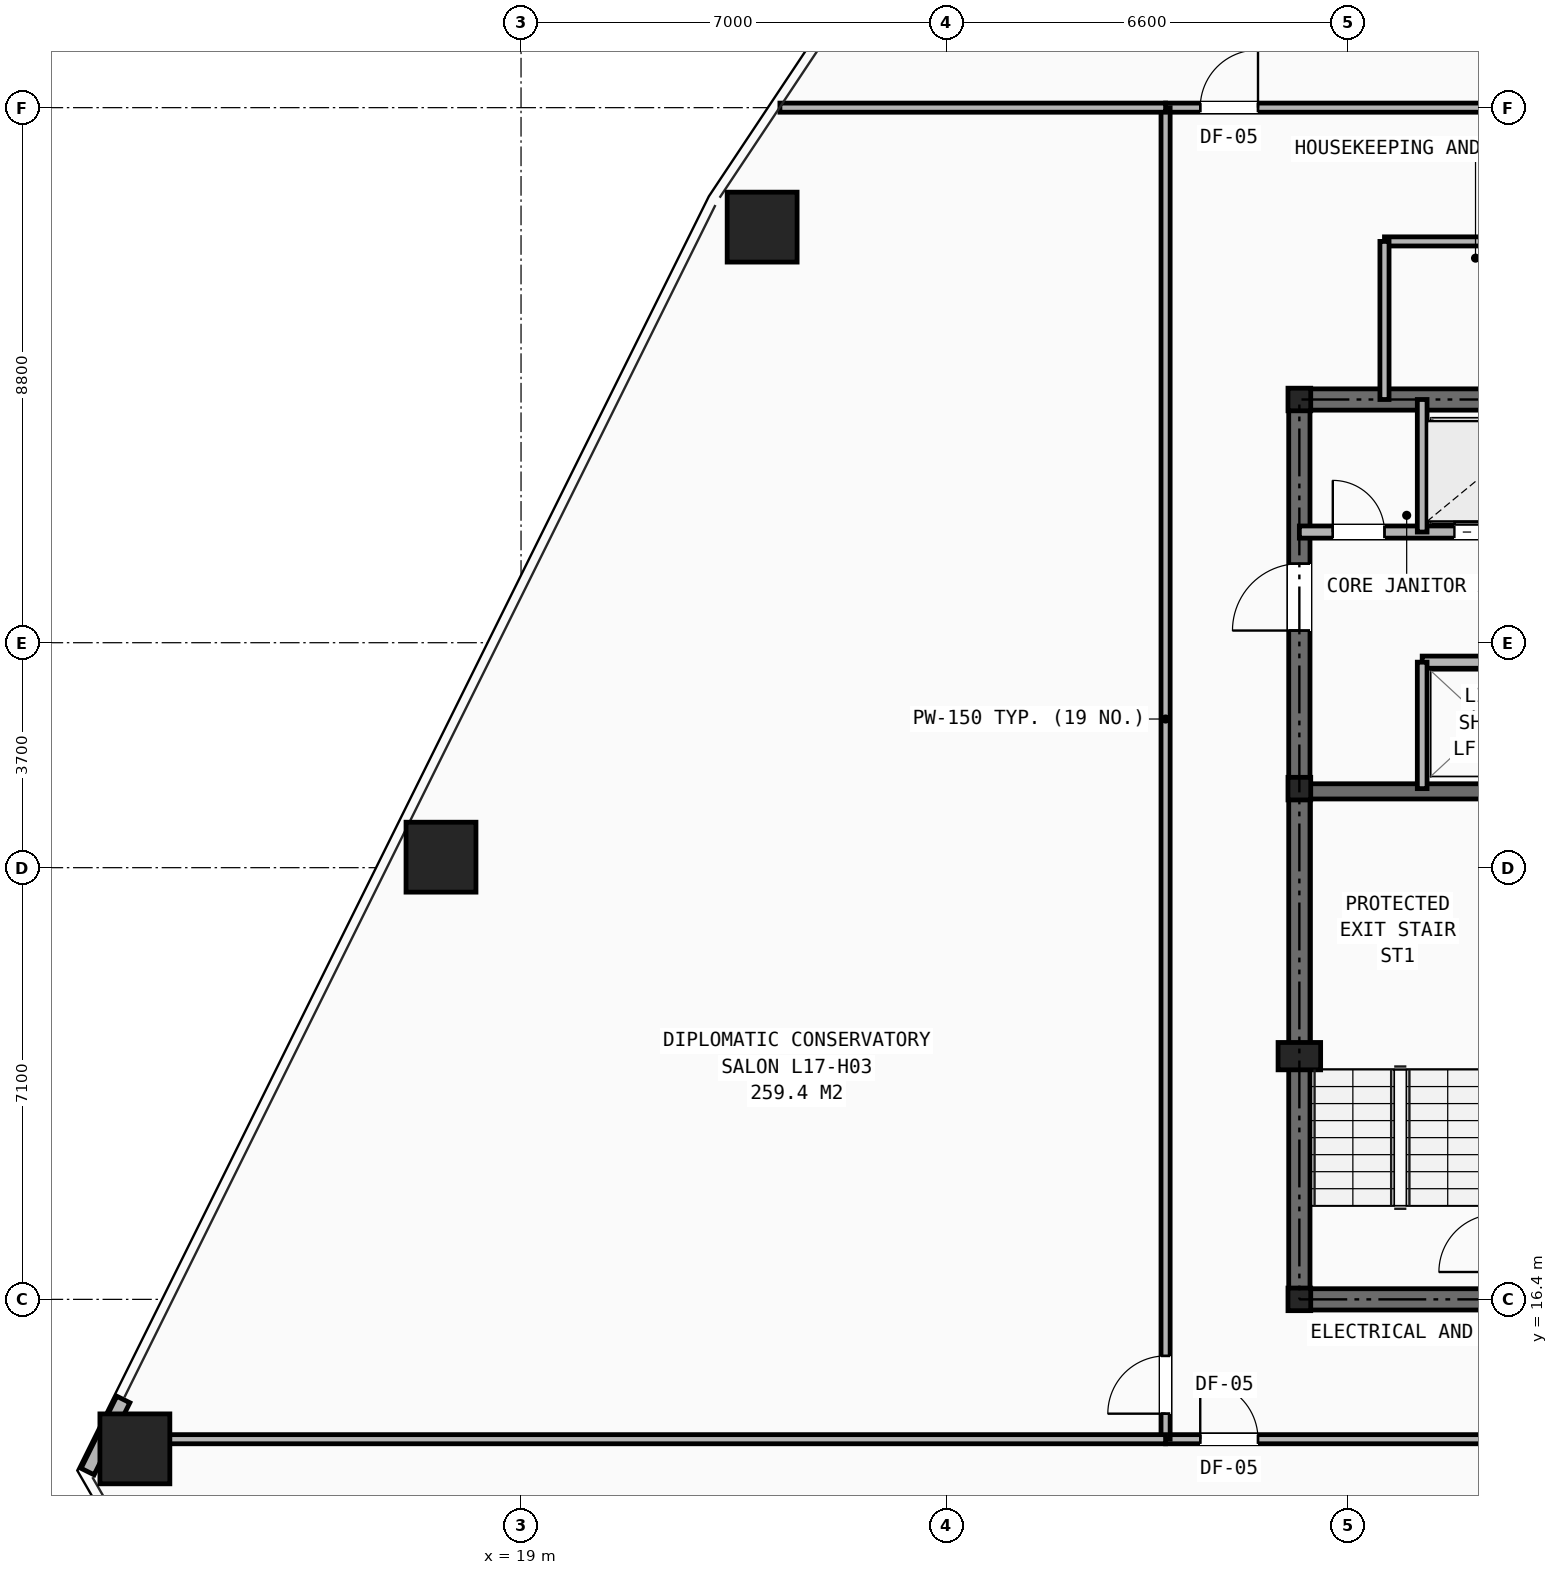
"""IFC4 building model, lengths in metres.
Left out: names, types, materials, properties, quantities, classifications, styles, units other than length and angle.
Written with IfcOpenShell. Run it as: python <this file> out.ifc"""

import sys

from ifc_helpers import new_model, si_unit, direction, frame, frame_2d, origin, origin_2d, place, context, subcontext, project, spatial, rectangle, hollow_rectangle, i_section, extrude, element, fill, save


model = new_model("IFC4")
c1 = context("Model", 3, precision=1e-05, world=origin(), true_north=direction((0.0, 1.0)))
c2 = subcontext(c1, "Body", "Model", "MODEL_VIEW")
j1 = project(units=[si_unit("LENGTHUNIT", "METRE"), si_unit("PLANEANGLEUNIT", "RADIAN")], contexts=[c1])
p1 = place(None, origin())
s1 = spatial("IfcSite", under=j1, at=p1, CompositionType="ELEMENT")
p2 = place(p1, origin())
s2 = spatial("IfcBuilding", under=s1, at=p2, CompositionType="ELEMENT")
p3 = place(p2, frame((0.0, 0.0, 62.4)))
s3 = spatial("IfcBuildingStorey", under=s2, at=p3, CompositionType="ELEMENT", Elevation=62.4)
for number, where, z_axis, x_axis in (
    (1, (31.8, 16.4, 0.0), (0.0, 0.0, 1.0), (1.0, 0.0, 0.0)),
    (2, (31.8, 24.8, 0.0), (0.0, 0.0, 1.0), (1.0, 0.0, 0.0)),
    (3, (31.8, 31.2, 0.0), (0.0, 0.0, 1.0), (1.0, 0.0, 0.0)),
):
    element("IfcColumn", number, at=place(p3, frame(where, z_axis=z_axis, x_axis=x_axis)), inside=s3, PredefinedType="COLUMN", context=c2, shape_type="SweptSolid", body=[
        extrude(i_section(OverallWidth=0.374, OverallDepth=0.372, WebThickness=0.016, FlangeThickness=0.026, at=origin_2d()), origin(), (0.0, 0.0, 1.0), 3.2),
    ])
p4 = place(p3, frame((31.8, 20.4, 0.0), z_axis=(0.0, 0.0, 1.0), x_axis=(1.0, 0.0, 0.0)))
e4 = element("IfcColumn", 4, at=p4, inside=s3, PredefinedType="PILASTER", context=c2, shape_type="SweptSolid", body=[
    extrude(rectangle(XDim=0.7, YDim=0.45, at=origin_2d()), origin(), (0.0, 0.0, 1.0), 3.2),
])
for number, where, z_axis, x_axis in (
    (5, (22.965, 34.035, 0.0), (0.0, 0.0, 1.0), (1.0, 0.0, 0.0)),
    (6, (17.684, 23.673, 0.0), (0.0, 0.0, 1.0), (1.0, 0.0, 0.0)),
    (7, (12.649, 13.941, 0.0), (0.0, 0.0, 1.0), (1.0, 0.0, 0.0)),
):
    element("IfcColumn", number, at=place(p3, frame(where, z_axis=z_axis, x_axis=x_axis)), inside=s3, PredefinedType="COLUMN", context=c2, shape_type="SweptSolid", body=[
        extrude(hollow_rectangle(XDim=1.15, YDim=1.15, WallThickness=0.075, at=origin_2d()), origin(), (0.0, 0.0, 1.0), 3.2),
    ])
p5 = place(p3, frame((12.459, 14.754, 0.0), z_axis=(0.0, 0.0, 1.0), x_axis=(-0.444037765369, -0.896008070793, 0.0)))
e8 = element("IfcWall", 8, at=p5, inside=s3, PredefinedType="SHEAR", context=c2, shape_type="SweptSolid", body=[
    extrude(rectangle(XDim=1.323, YDim=0.24, at=frame_2d((0.662, 0.0))), origin(), (0.0, 0.0, 1.0), 2.263),
])
p6 = place(p3, frame((31.8, 16.4, 0.0), z_axis=(0.0, 0.0, 1.0), x_axis=(1.0, 0.0, 0.0)))
e9 = element("IfcWall", 9, at=p6, inside=s3, PredefinedType="SHEAR", context=c2, shape_type="SweptSolid", body=[
    extrude(rectangle(XDim=16.4, YDim=0.35, at=frame_2d((8.2, 0.0))), origin(), (0.0, 0.0, 1.0), 2.98),
])
p7 = place(p6, frame((7.75, 0.0, 0.0)))
e10 = element("IfcOpeningElement", 10, at=p7, cuts=e9, PredefinedType="OPENING", context=c2, shape_type="SweptSolid", body=[
    extrude(rectangle(XDim=0.9, YDim=2.1, at=frame_2d((0.45, 1.05))), frame((0.0, 0.185, 0.0), z_axis=(0.0, -1.0, 0.0), x_axis=(1.0, 0.0, 0.0)), (0.0, 0.0, 1.0), 0.37),
])
p8 = place(p6, frame((4.2, 0.0, 0.0)))
e11 = element("IfcOpeningElement", 11, at=p8, cuts=e9, PredefinedType="OPENING", context=c2, shape_type="SweptSolid", body=[
    extrude(rectangle(XDim=0.95, YDim=2.1, at=frame_2d((0.475, 1.05))), frame((0.0, 0.185, 0.0), z_axis=(0.0, -1.0, 0.0), x_axis=(1.0, 0.0, 0.0)), (0.0, 0.0, 1.0), 0.37),
])
p9 = place(p6, frame((10.6, 0.0, 0.0)))
e12 = element("IfcOpeningElement", 12, at=p9, cuts=e9, PredefinedType="OPENING", context=c2, shape_type="SweptSolid", body=[
    extrude(rectangle(XDim=0.95, YDim=2.1, at=frame_2d((0.475, 1.05))), frame((0.0, 0.185, 0.0), z_axis=(0.0, -1.0, 0.0), x_axis=(1.0, 0.0, 0.0)), (0.0, 0.0, 1.0), 0.37),
])
p10 = place(p3, frame((31.8, 31.2, 0.0), z_axis=(0.0, 0.0, 1.0), x_axis=(1.0, 0.0, 0.0)))
e13 = element("IfcWall", 13, at=p10, inside=s3, PredefinedType="SHEAR", context=c2, shape_type="SweptSolid", body=[
    extrude(rectangle(XDim=16.4, YDim=0.35, at=frame_2d((8.2, 0.0))), origin(), (0.0, 0.0, 1.0), 2.98),
])
p11 = place(p3, frame((31.8, 16.4, 0.0), z_axis=(0.0, 0.0, 1.0), x_axis=(0.0, 1.0, 0.0)))
e14 = element("IfcWall", 14, at=p11, inside=s3, PredefinedType="SHEAR", context=c2, shape_type="SweptSolid", body=[
    extrude(rectangle(XDim=14.8, YDim=0.35, at=frame_2d((7.4, 0.0))), origin(), (0.0, 0.0, 1.0), 2.98),
])
p12 = place(p11, frame((11.0, 0.0, 0.0)))
e15 = element("IfcOpeningElement", 15, at=p12, cuts=e14, PredefinedType="OPENING", context=c2, shape_type="SweptSolid", body=[
    extrude(rectangle(XDim=1.1, YDim=2.15, at=frame_2d((0.55, 1.075))), frame((0.0, 0.185, 0.0), z_axis=(0.0, -1.0, 0.0), x_axis=(1.0, 0.0, 0.0)), (0.0, 0.0, 1.0), 0.37),
])
p13 = place(p3, frame((31.8, 24.755, 0.0), z_axis=(0.0, 0.0, 1.0), x_axis=(1.0, 0.0, 0.0)))
e16 = element("IfcWall", 16, at=p13, inside=s3, PredefinedType="SHEAR", context=c2, shape_type="SweptSolid", body=[
    extrude(rectangle(XDim=3.245, YDim=0.25, at=frame_2d((1.623, 0.0))), origin(), (0.0, 0.0, 1.0), 2.98),
])
p14 = place(p3, frame((31.8, 29.02, 0.0), z_axis=(0.0, 0.0, 1.0), x_axis=(1.0, 0.0, 0.0)))
e17 = element("IfcWall", 17, at=p14, inside=s3, PredefinedType="SOLIDWALL", context=c2, shape_type="SweptSolid", body=[
    extrude(rectangle(XDim=16.4, YDim=0.2, at=frame_2d((8.2, 0.0))), origin(), (0.0, 0.0, 1.0), 2.431),
])
p15 = place(p14, frame((0.55, 0.0, 0.0)))
e18 = element("IfcOpeningElement", 18, at=p15, cuts=e17, PredefinedType="OPENING", context=c2, shape_type="SweptSolid", body=[
    extrude(rectangle(XDim=0.85, YDim=2.05, at=frame_2d((0.425, 1.025))), frame((0.0, 0.11, 0.0), z_axis=(0.0, -1.0, 0.0), x_axis=(1.0, 0.0, 0.0)), (0.0, 0.0, 1.0), 0.22),
])
p16 = place(p14, frame((2.55, 0.0, 0.0)))
e19 = element("IfcOpeningElement", 19, at=p16, cuts=e17, PredefinedType="OPENING", context=c2, shape_type="SweptSolid", body=[
    extrude(rectangle(XDim=1.1, YDim=2.15, at=frame_2d((0.55, 1.075))), frame((0.0, 0.11, 0.0), z_axis=(0.0, -1.0, 0.0), x_axis=(1.0, 0.0, 0.0)), (0.0, 0.0, 1.0), 0.22),
])
p17 = place(p14, frame((4.71, 0.0, 0.0)))
e20 = element("IfcOpeningElement", 20, at=p17, cuts=e17, PredefinedType="OPENING", context=c2, shape_type="SweptSolid", body=[
    extrude(rectangle(XDim=1.1, YDim=2.15, at=frame_2d((0.55, 1.075))), frame((0.0, 0.11, 0.0), z_axis=(0.0, -1.0, 0.0), x_axis=(1.0, 0.0, 0.0)), (0.0, 0.0, 1.0), 0.22),
])
p18 = place(p14, frame((6.87, 0.0, 0.0)))
e21 = element("IfcOpeningElement", 21, at=p18, cuts=e17, PredefinedType="OPENING", context=c2, shape_type="SweptSolid", body=[
    extrude(rectangle(XDim=1.1, YDim=2.15, at=frame_2d((0.55, 1.075))), frame((0.0, 0.11, 0.0), z_axis=(0.0, -1.0, 0.0), x_axis=(1.0, 0.0, 0.0)), (0.0, 0.0, 1.0), 0.22),
])
p19 = place(p14, frame((9.03, 0.0, 0.0)))
e22 = element("IfcOpeningElement", 22, at=p19, cuts=e17, PredefinedType="OPENING", context=c2, shape_type="SweptSolid", body=[
    extrude(rectangle(XDim=1.1, YDim=2.15, at=frame_2d((0.55, 1.075))), frame((0.0, 0.11, 0.0), z_axis=(0.0, -1.0, 0.0), x_axis=(1.0, 0.0, 0.0)), (0.0, 0.0, 1.0), 0.22),
])
p20 = place(p3, frame((33.82, 26.88, 0.0), z_axis=(0.0, 0.0, 1.0), x_axis=(1.0, 0.0, 0.0)))
e23 = element("IfcWall", 23, at=p20, inside=s3, PredefinedType="SOLIDWALL", context=c2, shape_type="SweptSolid", body=[
    extrude(rectangle(XDim=14.38, YDim=0.2, at=frame_2d((7.19, 0.0))), origin(), (0.0, 0.0, 1.0), 2.431),
])
p21 = place(p3, frame((33.82, 29.02, 0.0), z_axis=(0.0, 0.0, 1.0), x_axis=(0.0, 1.0, 0.0)))
e24 = element("IfcWall", 24, at=p21, inside=s3, PredefinedType="SOLIDWALL", context=c2, shape_type="SweptSolid", body=[
    extrude(rectangle(XDim=2.18, YDim=0.16, at=frame_2d((1.09, 0.0))), origin(), (0.0, 0.0, 1.0), 2.431),
])
p22 = place(p3, frame((33.82, 24.8, 0.0), z_axis=(0.0, 0.0, 1.0), x_axis=(0.0, 1.0, 0.0)))
e25 = element("IfcWall", 25, at=p22, inside=s3, PredefinedType="SOLIDWALL", context=c2, shape_type="SweptSolid", body=[
    extrude(rectangle(XDim=2.08, YDim=0.16, at=frame_2d((1.04, 0.0))), origin(), (0.0, 0.0, 1.0), 2.98),
])
p23 = place(p3, frame((33.2, 33.8, 0.0), z_axis=(0.0, 0.0, 1.0), x_axis=(1.0, 0.0, 0.0)))
e26 = element("IfcWall", 26, at=p23, inside=s3, PredefinedType="PARTITIONING", context=c2, shape_type="SweptSolid", body=[
    extrude(rectangle(XDim=13.0, YDim=0.15, at=frame_2d((6.5, 0.0))), origin(), (0.0, 0.0, 1.0), 2.98),
])
p24 = place(p23, frame((1.7, 0.0, 0.0)))
e27 = element("IfcOpeningElement", 27, at=p24, cuts=e26, PredefinedType="OPENING", context=c2, shape_type="SweptSolid", body=[
    extrude(rectangle(XDim=0.9, YDim=2.1, at=frame_2d((0.45, 1.05))), frame((0.0, 0.085, 0.0), z_axis=(0.0, -1.0, 0.0), x_axis=(1.0, 0.0, 0.0)), (0.0, 0.0, 1.0), 0.17),
])
p25 = place(p23, frame((6.0, 0.0, 0.0)))
e28 = element("IfcOpeningElement", 28, at=p25, cuts=e26, PredefinedType="OPENING", context=c2, shape_type="SweptSolid", body=[
    extrude(rectangle(XDim=0.9, YDim=2.1, at=frame_2d((0.45, 1.05))), frame((0.0, 0.085, 0.0), z_axis=(0.0, -1.0, 0.0), x_axis=(1.0, 0.0, 0.0)), (0.0, 0.0, 1.0), 0.17),
])
p26 = place(p23, frame((10.35, 0.0, 0.0)))
e29 = element("IfcOpeningElement", 29, at=p26, cuts=e26, PredefinedType="OPENING", context=c2, shape_type="SweptSolid", body=[
    extrude(rectangle(XDim=0.9, YDim=2.1, at=frame_2d((0.45, 1.05))), frame((0.0, 0.085, 0.0), z_axis=(0.0, -1.0, 0.0), x_axis=(1.0, 0.0, 0.0)), (0.0, 0.0, 1.0), 0.17),
])
p27 = place(p3, frame((33.2, 31.2, 0.0), z_axis=(0.0, 0.0, 1.0), x_axis=(0.0, 1.0, 0.0)))
e30 = element("IfcWall", 30, at=p27, inside=s3, PredefinedType="PARTITIONING", context=c2, shape_type="SweptSolid", body=[
    extrude(rectangle(XDim=2.6, YDim=0.15, at=frame_2d((1.3, 0.0))), origin(), (0.0, 0.0, 1.0), 2.431),
])
p28 = place(p3, frame((29.6, 14.1, 0.0), z_axis=(0.0, 0.0, 1.0), x_axis=(1.0, 0.0, 0.0)))
e31 = element("IfcWall", 31, at=p28, inside=s3, PredefinedType="PARTITIONING", context=c2, shape_type="SweptSolid", body=[
    extrude(rectangle(XDim=20.8, YDim=0.15, at=frame_2d((10.4, 0.0))), origin(), (0.0, 0.0, 1.0), 2.431),
])
p29 = place(p28, frame((0.57, 0.0, 0.0)))
e32 = element("IfcOpeningElement", 32, at=p29, cuts=e31, PredefinedType="OPENING", context=c2, shape_type="SweptSolid", body=[
    extrude(rectangle(XDim=0.95, YDim=2.1, at=frame_2d((0.475, 1.05))), frame((0.0, 0.085, 0.0), z_axis=(0.0, -1.0, 0.0), x_axis=(1.0, 0.0, 0.0)), (0.0, 0.0, 1.0), 0.17),
])
p30 = place(p28, frame((9.32, 0.0, 0.0)))
e33 = element("IfcOpeningElement", 33, at=p30, cuts=e31, PredefinedType="OPENING", context=c2, shape_type="SweptSolid", body=[
    extrude(rectangle(XDim=0.95, YDim=2.1, at=frame_2d((0.475, 1.05))), frame((0.0, 0.085, 0.0), z_axis=(0.0, -1.0, 0.0), x_axis=(1.0, 0.0, 0.0)), (0.0, 0.0, 1.0), 0.17),
])
p31 = place(p3, frame((29.6, 36.0, 0.0), z_axis=(0.0, 0.0, 1.0), x_axis=(1.0, 0.0, 0.0)))
e34 = element("IfcWall", 34, at=p31, inside=s3, PredefinedType="PARTITIONING", context=c2, shape_type="SweptSolid", body=[
    extrude(rectangle(XDim=9.65, YDim=0.15, at=frame_2d((4.825, 0.0))), origin(), (0.0, 0.0, 1.0), 2.98),
])
p32 = place(p31, frame((0.57, 0.0, 0.0)))
e35 = element("IfcOpeningElement", 35, at=p32, cuts=e34, PredefinedType="OPENING", context=c2, shape_type="SweptSolid", body=[
    extrude(rectangle(XDim=0.95, YDim=2.1, at=frame_2d((0.475, 1.05))), frame((0.0, 0.085, 0.0), z_axis=(0.0, -1.0, 0.0), x_axis=(1.0, 0.0, 0.0)), (0.0, 0.0, 1.0), 0.17),
])
p33 = place(p3, frame((29.6, 14.1, 0.0), z_axis=(0.0, 0.0, 1.0), x_axis=(0.0, 1.0, 0.0)))
e36 = element("IfcWall", 36, at=p33, inside=s3, PredefinedType="PARTITIONING", context=c2, shape_type="SweptSolid", body=[
    extrude(rectangle(XDim=21.9, YDim=0.15, at=frame_2d((10.95, 0.0))), origin(), (0.0, 0.0, 1.0), 2.431),
])
p34 = place(p33, frame((0.42, 0.0, 0.0)))
e37 = element("IfcOpeningElement", 37, at=p34, cuts=e36, PredefinedType="OPENING", context=c2, shape_type="SweptSolid", body=[
    extrude(rectangle(XDim=0.95, YDim=2.1, at=frame_2d((0.475, 1.05))), frame((0.0, 0.085, 0.0), z_axis=(0.0, -1.0, 0.0), x_axis=(1.0, 0.0, 0.0)), (0.0, 0.0, 1.0), 0.17),
])
p35 = place(p3, frame((12.141, 14.1, 0.0), z_axis=(0.0, 0.0, 1.0), x_axis=(1.0, 0.0, 0.0)))
e38 = element("IfcWall", 38, at=p35, inside=s3, PredefinedType="PARTITIONING", context=c2, shape_type="SweptSolid", body=[
    extrude(rectangle(XDim=17.459, YDim=0.15, at=frame_2d((8.73, 0.0))), origin(), (0.0, 0.0, 1.0), 2.268),
])
p36 = place(p3, frame((23.257, 36.0, 0.0), z_axis=(0.0, 0.0, 1.0), x_axis=(1.0, 0.0, 0.0)))
e39 = element("IfcWall", 39, at=p36, inside=s3, PredefinedType="PARTITIONING", context=c2, shape_type="SweptSolid", body=[
    extrude(rectangle(XDim=6.343, YDim=0.15, at=frame_2d((3.171, 0.0))), origin(), (0.0, 0.0, 1.0), 2.268),
])
p37 = place(p15, origin())
e40 = element("IfcDoor", 40, at=p37, inside=s3, OperationType="SINGLE_SWING_LEFT", PredefinedType="DOOR", context=c2, shape_type="SweptSolid", body=[
    extrude(rectangle(XDim=0.85, YDim=2.05, at=frame_2d((0.425, 1.025))), frame((0.0, 0.025, 0.0), z_axis=(0.0, -1.0, 0.0), x_axis=(1.0, 0.0, 0.0)), (0.0, 0.0, 1.0), 0.05),
])
fill(e18, e40)
p38 = place(p12, origin())
e41 = element("IfcDoor", 41, at=p38, inside=s3, OperationType="SINGLE_SWING_LEFT", PredefinedType="DOOR", context=c2, shape_type="SweptSolid", body=[
    extrude(rectangle(XDim=1.1, YDim=2.15, at=frame_2d((0.55, 1.075))), frame((0.0, 0.025, 0.0), z_axis=(0.0, -1.0, 0.0), x_axis=(1.0, 0.0, 0.0)), (0.0, 0.0, 1.0), 0.05),
])
fill(e15, e41)
p39 = place(p16, origin())
e42 = element("IfcDoor", 42, at=p39, inside=s3, OperationType="DOUBLE_DOOR_SLIDING", PredefinedType="DOOR", context=c2, shape_type="SweptSolid", body=[
    extrude(rectangle(XDim=1.1, YDim=2.15, at=frame_2d((0.55, 1.075))), frame((0.0, 0.025, 0.0), z_axis=(0.0, -1.0, 0.0), x_axis=(1.0, 0.0, 0.0)), (0.0, 0.0, 1.0), 0.05),
])
fill(e19, e42)
p40 = place(p29, origin())
e43 = element("IfcDoor", 43, at=p40, inside=s3, OperationType="SINGLE_SWING_LEFT", PredefinedType="DOOR", context=c2, shape_type="SweptSolid", body=[
    extrude(rectangle(XDim=0.95, YDim=2.1, at=frame_2d((0.475, 1.05))), frame((0.0, 0.025, 0.0), z_axis=(0.0, -1.0, 0.0), x_axis=(1.0, 0.0, 0.0)), (0.0, 0.0, 1.0), 0.05),
])
fill(e32, e43)
p41 = place(p34, origin())
e44 = element("IfcDoor", 44, at=p41, inside=s3, OperationType="SINGLE_SWING_LEFT", PredefinedType="DOOR", context=c2, shape_type="SweptSolid", body=[
    extrude(rectangle(XDim=0.95, YDim=2.1, at=frame_2d((0.475, 1.05))), frame((0.0, 0.025, 0.0), z_axis=(0.0, -1.0, 0.0), x_axis=(1.0, 0.0, 0.0)), (0.0, 0.0, 1.0), 0.05),
])
fill(e37, e44)
p42 = place(p32, origin())
e45 = element("IfcDoor", 45, at=p42, inside=s3, OperationType="SINGLE_SWING_RIGHT", PredefinedType="DOOR", context=c2, shape_type="SweptSolid", body=[
    extrude(rectangle(XDim=0.95, YDim=2.1, at=frame_2d((0.475, 1.05))), frame((0.0, 0.025, 0.0), z_axis=(0.0, -1.0, 0.0), x_axis=(1.0, 0.0, 0.0)), (0.0, 0.0, 1.0), 0.05),
])
fill(e35, e45)
save(model, sys.argv[1])
